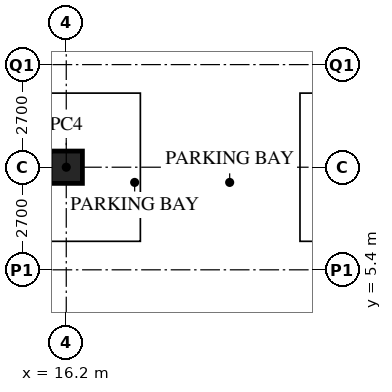
"""IFC4 building model, lengths in metres.
Left out: names, types, materials, properties, quantities, classifications, styles, units other than length and angle.
Written with IfcOpenShell. Run it as: python <this file> out.ifc"""

import sys

from ifc_helpers import new_model, si_unit, direction, frame, origin, origin_2d, place, context, subcontext, project, spatial, hollow_rectangle, extrude, element, save


model = new_model("IFC4")
c1 = context("Model", 3, precision=1e-05, world=origin(), true_north=direction((0.0, 1.0)))
c2 = subcontext(c1, "Body", "Model", "MODEL_VIEW")
j1 = project(units=[si_unit("LENGTHUNIT", "METRE"), si_unit("PLANEANGLEUNIT", "RADIAN")], contexts=[c1])
p1 = place(None, origin())
s1 = spatial("IfcSite", under=j1, at=p1, CompositionType="ELEMENT")
p2 = place(p1, origin())
s2 = spatial("IfcBuilding", under=s1, at=p2, CompositionType="ELEMENT")
p3 = place(p2, frame((0.0, 0.0, -8.4)))
s3 = spatial("IfcBuildingStorey", under=s2, at=p3, CompositionType="ELEMENT", Elevation=-8.4)
p4 = place(p3, frame((16.2, 8.1, 0.0), z_axis=(0.0, 0.0, 1.0), x_axis=(1.0, 0.0, 0.0)))
e1 = element("IfcColumn", 1, at=p4, inside=s3, PredefinedType="COLUMN", context=c2, shape_type="SweptSolid", body=[
    extrude(hollow_rectangle(XDim=0.85, YDim=0.85, WallThickness=0.085, at=origin_2d()), origin(), (0.0, 0.0, 1.0), 4.2),
])
save(model, sys.argv[1])
